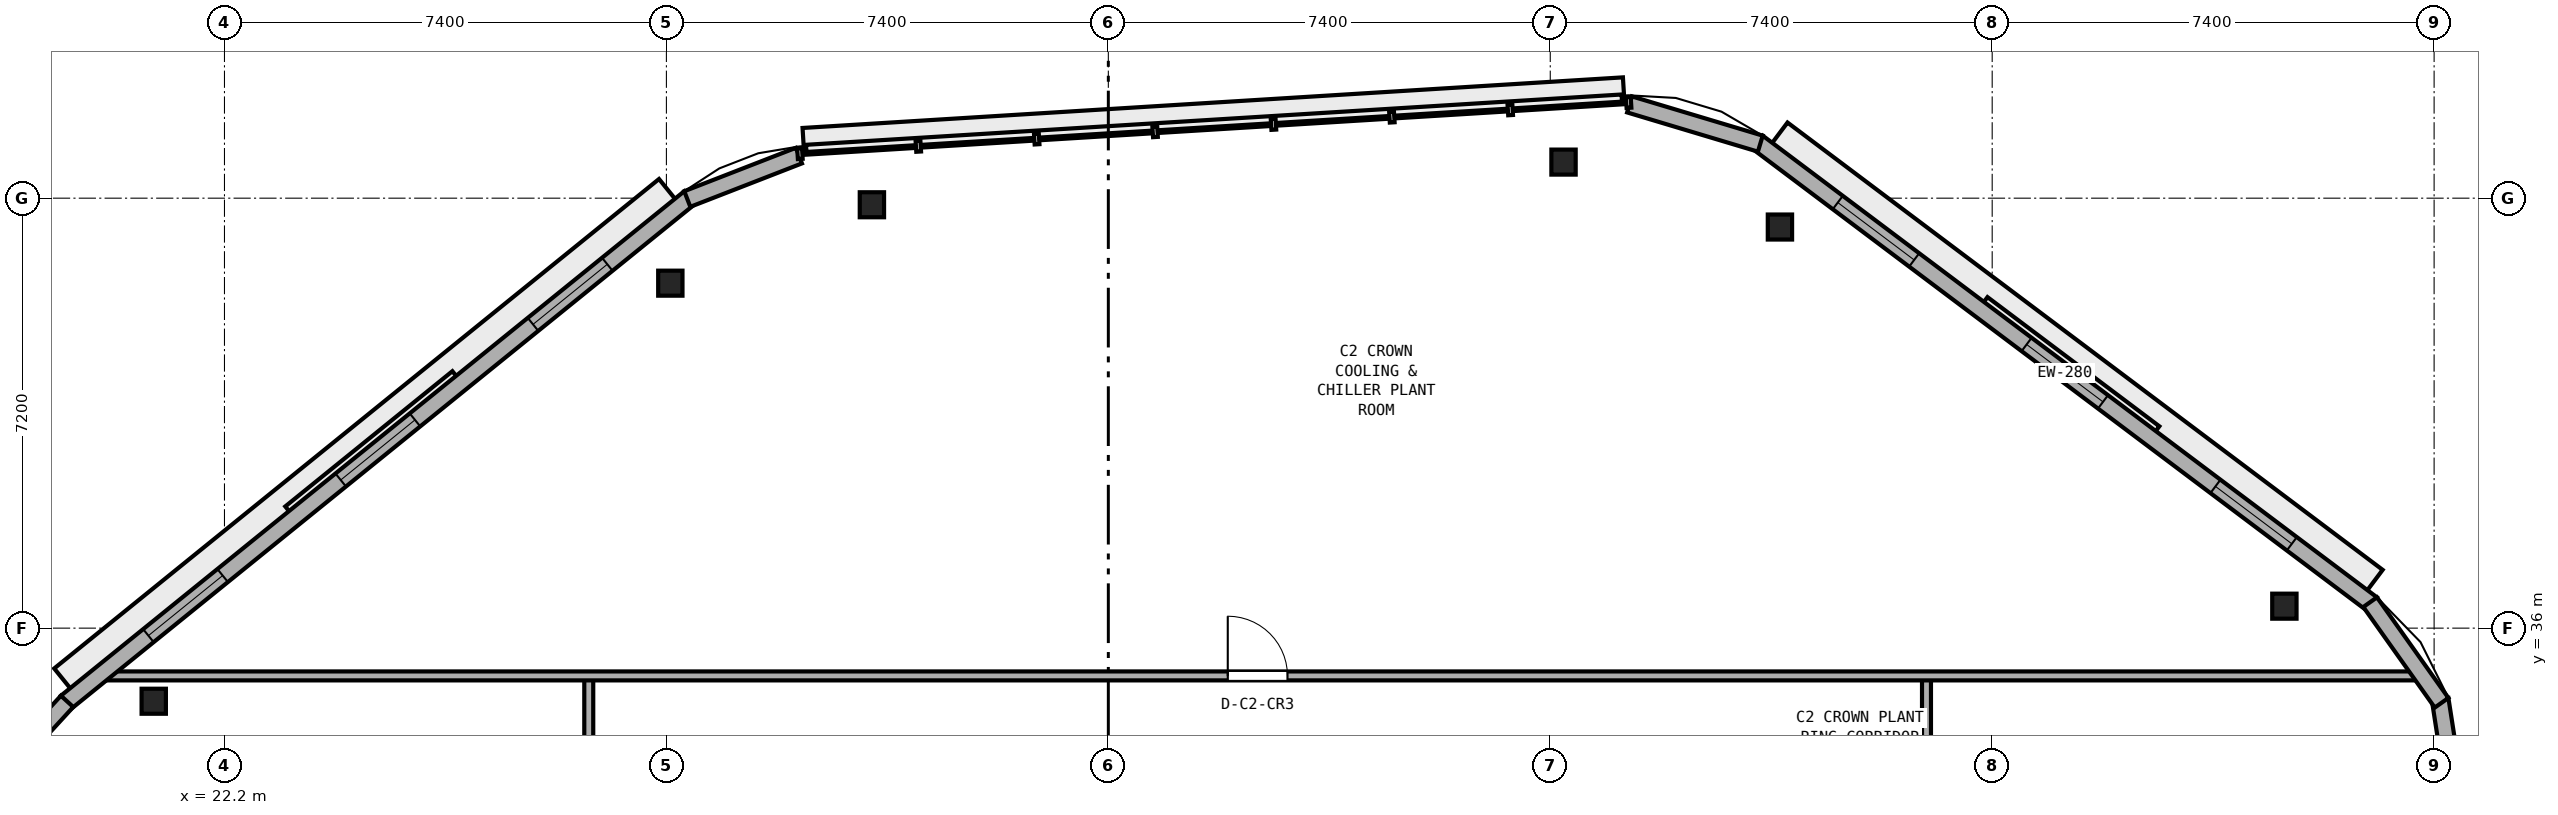
"""IFC4 building model, lengths in metres.
Left out: names, types, materials, properties, quantities, classifications, styles, units other than length and angle.
Written with IfcOpenShell. Run it as: python <this file> out.ifc"""

import sys

from ifc_helpers import new_model, si_unit, direction, frame, frame_2d, origin, origin_2d, place, context, subcontext, project, spatial, rectangle, i_section, extrude, element, fill, save


model = new_model("IFC4")
c1 = context("Model", 3, precision=1e-05, world=origin(), true_north=direction((0.0, 1.0)))
c2 = subcontext(c1, "Body", "Model", "MODEL_VIEW")
j1 = project(units=[si_unit("LENGTHUNIT", "METRE"), si_unit("PLANEANGLEUNIT", "RADIAN")], contexts=[c1])
p1 = place(None, origin())
s1 = spatial("IfcSite", under=j1, at=p1, CompositionType="ELEMENT")
p2 = place(p1, origin())
s2 = spatial("IfcBuilding", under=s1, at=p2, CompositionType="ELEMENT")
p3 = place(p2, frame((0.0, 0.0, 317.4)))
s3 = spatial("IfcBuildingStorey", under=s2, at=p3, CompositionType="ELEMENT", Elevation=317.4)
for number, where, z_axis, x_axis in (
    (1, (56.693, 36.368, 0.0), (0.0, 0.0, 1.0), (1.0, 0.0, 0.0)),
    (2, (48.246, 42.717, 0.0), (0.0, 0.0, 1.0), (1.0, 0.0, 0.0)),
    (3, (44.622, 43.804, 0.0), (0.0, 0.0, 1.0), (1.0, 0.0, 0.0)),
    (4, (33.041, 43.09, 0.0), (0.0, 0.0, 1.0), (1.0, 0.0, 0.0)),
    (5, (29.666, 41.777, 0.0), (0.0, 0.0, 1.0), (1.0, 0.0, 0.0)),
    (6, (21.016, 34.776, 0.0), (0.0, 0.0, 1.0), (1.0, 0.0, 0.0)),
):
    element("IfcColumn", number, at=place(p3, frame(where, z_axis=z_axis, x_axis=x_axis)), inside=s3, PredefinedType="COLUMN", context=c2, shape_type="SweptSolid", body=[
        extrude(i_section(OverallWidth=0.407, OverallDepth=0.419, WebThickness=0.031, FlangeThickness=0.049, at=origin_2d()), origin(), (0.0, 0.0, 1.0), 4.0),
    ])
p4 = place(p3, frame((50.7, 28.41, 0.0), z_axis=(0.0, 0.0, 1.0), x_axis=(0.0, 1.0, 0.0)))
e7 = element("IfcWall", 7, at=p4, inside=s3, PredefinedType="PARTITIONING", context=c2, shape_type="SweptSolid", body=[
    extrude(rectangle(XDim=6.79, YDim=0.15, at=frame_2d((3.395, 0.0))), origin(), (0.0, 0.0, 1.0), 3.72),
])
p5 = place(p3, frame((28.3, 15.2, 0.0), z_axis=(0.0, 0.0, 1.0), x_axis=(0.0, 1.0, 0.0)))
e8 = element("IfcWall", 8, at=p5, inside=s3, PredefinedType="PARTITIONING", context=c2, shape_type="SweptSolid", body=[
    extrude(rectangle(XDim=20.0, YDim=0.15, at=frame_2d((10.0, 0.0))), origin(), (0.0, 0.0, 1.0), 3.72),
])
p6 = place(p5, frame((9.5, 0.0, 0.0)))
e9 = element("IfcOpeningElement", 9, at=p6, cuts=e8, PredefinedType="OPENING", context=c2, shape_type="SweptSolid", body=[
    extrude(rectangle(XDim=1.0, YDim=2.12, at=frame_2d((0.5, 1.06))), frame((0.0, 0.085, 0.0), z_axis=(0.0, -1.0, 0.0), x_axis=(1.0, 0.0, 0.0)), (0.0, 0.0, 1.0), 0.17),
])
p7 = place(p3, frame((20.01, 35.2, 0.0), z_axis=(0.0, 0.0, 1.0), x_axis=(1.0, 0.0, 0.0)))
e10 = element("IfcWall", 10, at=p7, inside=s3, PredefinedType="PARTITIONING", context=c2, shape_type="SweptSolid", body=[
    extrude(rectangle(XDim=39.04, YDim=0.15, at=frame_2d((19.52, 0.0))), origin(), (0.0, 0.0, 1.0), 2.37),
])
p8 = place(p7, frame((18.99, 0.0, 0.0)))
e11 = element("IfcOpeningElement", 11, at=p8, cuts=e10, PredefinedType="OPENING", context=c2, shape_type="SweptSolid", body=[
    extrude(rectangle(XDim=1.0, YDim=2.12, at=frame_2d((0.5, 1.06))), frame((0.0, 0.085, 0.0), z_axis=(0.0, -1.0, 0.0), x_axis=(1.0, 0.0, 0.0)), (0.0, 0.0, 1.0), 0.17),
])
p9 = place(p3, frame((58.159, 36.404, 0.0), z_axis=(0.0, 0.0, 1.0), x_axis=(-0.799362001769, 0.600849723415, 0.0)))
e12 = element("IfcWall", 12, at=p9, inside=s3, PredefinedType="STANDARD", context=c2, shape_type="SweptSolid", body=[
    extrude(rectangle(XDim=12.867, YDim=0.28, at=frame_2d((6.433, 0.0))), origin(), (0.0, 0.0, 1.0), 3.72),
])
p10 = place(p9, frame((1.678, 0.0, 0.9)))
e13 = element("IfcOpeningElement", 13, at=p10, cuts=e12, PredefinedType="OPENING", context=c2, shape_type="SweptSolid", body=[
    extrude(rectangle(XDim=1.6, YDim=1.45, at=frame_2d((0.8, 0.725))), frame((0.0, 0.15, 0.0), z_axis=(0.0, -1.0, 0.0), x_axis=(1.0, 0.0, 0.0)), (0.0, 0.0, 1.0), 0.3),
])
p11 = place(p9, frame((5.633, 0.0, 0.9)))
e14 = element("IfcOpeningElement", 14, at=p11, cuts=e12, PredefinedType="OPENING", context=c2, shape_type="SweptSolid", body=[
    extrude(rectangle(XDim=1.6, YDim=1.45, at=frame_2d((0.8, 0.725))), frame((0.0, 0.15, 0.0), z_axis=(0.0, -1.0, 0.0), x_axis=(1.0, 0.0, 0.0)), (0.0, 0.0, 1.0), 0.3),
])
p12 = place(p9, frame((9.589, 0.0, 0.9)))
e15 = element("IfcOpeningElement", 15, at=p12, cuts=e12, PredefinedType="OPENING", context=c2, shape_type="SweptSolid", body=[
    extrude(rectangle(XDim=1.6, YDim=1.45, at=frame_2d((0.8, 0.725))), frame((0.0, 0.15, 0.0), z_axis=(0.0, -1.0, 0.0), x_axis=(1.0, 0.0, 0.0)), (0.0, 0.0, 1.0), 0.3),
])
p13 = place(p3, frame((29.987, 43.208, 0.0), z_axis=(0.0, 0.0, 1.0), x_axis=(-0.777319383305, -0.629106172548, 0.0)))
e16 = element("IfcWall", 16, at=p13, inside=s3, PredefinedType="STANDARD", context=c2, shape_type="SweptSolid", body=[
    extrude(rectangle(XDim=13.428, YDim=0.28, at=frame_2d((6.714, 0.0))), origin(), (0.0, 0.0, 1.0), 3.72),
])
p14 = place(p13, frame((1.771, 0.0, 0.9)))
e17 = element("IfcOpeningElement", 17, at=p14, cuts=e16, PredefinedType="OPENING", context=c2, shape_type="SweptSolid", body=[
    extrude(rectangle(XDim=1.6, YDim=1.45, at=frame_2d((0.8, 0.725))), frame((0.0, 0.15, 0.0), z_axis=(0.0, -1.0, 0.0), x_axis=(1.0, 0.0, 0.0)), (0.0, 0.0, 1.0), 0.3),
])
p15 = place(p13, frame((5.914, 0.0, 0.9)))
e18 = element("IfcOpeningElement", 18, at=p15, cuts=e16, PredefinedType="OPENING", context=c2, shape_type="SweptSolid", body=[
    extrude(rectangle(XDim=1.6, YDim=1.45, at=frame_2d((0.8, 0.725))), frame((0.0, 0.15, 0.0), z_axis=(0.0, -1.0, 0.0), x_axis=(1.0, 0.0, 0.0)), (0.0, 0.0, 1.0), 0.3),
])
p16 = place(p13, frame((10.057, 0.0, 0.9)))
e19 = element("IfcOpeningElement", 19, at=p16, cuts=e16, PredefinedType="OPENING", context=c2, shape_type="SweptSolid", body=[
    extrude(rectangle(XDim=1.6, YDim=1.45, at=frame_2d((0.8, 0.725))), frame((0.0, 0.15, 0.0), z_axis=(0.0, -1.0, 0.0), x_axis=(1.0, 0.0, 0.0)), (0.0, 0.0, 1.0), 0.3),
])
p17 = place(p3, frame((59.452, 33.841, 0.0), z_axis=(0.0, 0.0, 1.0), x_axis=(-0.153890702538, 0.988087876493, 0.0)))
e20 = element("IfcWall", 20, at=p17, inside=s3, PredefinedType="STANDARD", context=c2, shape_type="SweptSolid", body=[
    extrude(rectangle(XDim=0.98, YDim=0.28, at=frame_2d((0.49, 0.0))), origin(), (0.0, 0.0, 1.0), 3.72),
])
p18 = place(p3, frame((59.325, 34.75, 0.0), z_axis=(0.0, 0.0, 1.0), x_axis=(-0.578944699304, 0.815366810183, 0.0)))
e21 = element("IfcWall", 21, at=p18, inside=s3, PredefinedType="STANDARD", context=c2, shape_type="SweptSolid", body=[
    extrude(rectangle(XDim=2.066, YDim=0.28, at=frame_2d((1.033, 0.0))), origin(), (0.0, 0.0, 1.0), 3.72),
])
p19 = place(p3, frame((47.917, 44.113, 0.0), z_axis=(0.0, 0.0, 1.0), x_axis=(-0.957835100655, 0.287318499149, 0.0)))
e22 = element("IfcWall", 22, at=p19, inside=s3, PredefinedType="STANDARD", context=c2, shape_type="SweptSolid", body=[
    extrude(rectangle(XDim=2.287, YDim=0.28, at=frame_2d((1.143, 0.0))), origin(), (0.0, 0.0, 1.0), 3.72),
])
p20 = place(p3, frame((31.819, 43.913, 0.0), z_axis=(0.0, 0.0, 1.0), x_axis=(-0.931977254785, -0.362516753494, 0.0)))
e23 = element("IfcWall", 23, at=p20, inside=s3, PredefinedType="STANDARD", context=c2, shape_type="SweptSolid", body=[
    extrude(rectangle(XDim=2.006, YDim=0.28, at=frame_2d((1.003, 0.0))), origin(), (0.0, 0.0, 1.0), 3.72),
])
p21 = place(p3, frame((19.564, 34.774, 0.0), z_axis=(0.0, 0.0, 1.0), x_axis=(-0.675845585144, -0.737043245028, 0.0)))
e24 = element("IfcWall", 24, at=p21, inside=s3, PredefinedType="STANDARD", context=c2, shape_type="SweptSolid", body=[
    extrude(rectangle(XDim=1.005, YDim=0.28, at=frame_2d((0.503, 0.0))), origin(), (0.0, 0.0, 1.0), 3.72),
])
p22 = place(p8, origin())
e25 = element("IfcDoor", 25, at=p22, inside=s3, OperationType="SINGLE_SWING_LEFT", PredefinedType="DOOR", context=c2, shape_type="SweptSolid", body=[
    extrude(rectangle(XDim=1.0, YDim=2.12, at=frame_2d((0.5, 1.06))), frame((0.0, 0.025, 0.0), z_axis=(0.0, -1.0, 0.0), x_axis=(1.0, 0.0, 0.0)), (0.0, 0.0, 1.0), 0.05),
])
fill(e11, e25)
p23 = place(p10, origin())
e26 = element("IfcWindow", 26, at=p23, inside=s3, PartitioningType="SINGLE_PANEL", PredefinedType="WINDOW", context=c2, shape_type="SweptSolid", body=[
    extrude(rectangle(XDim=1.6, YDim=1.45, at=frame_2d((0.8, 0.725))), frame((0.0, 0.03, 0.0), z_axis=(0.0, -1.0, 0.0), x_axis=(1.0, 0.0, 0.0)), (0.0, 0.0, 1.0), 0.06),
])
fill(e13, e26)
p24 = place(p11, origin())
e27 = element("IfcWindow", 27, at=p24, inside=s3, PartitioningType="SINGLE_PANEL", PredefinedType="WINDOW", context=c2, shape_type="SweptSolid", body=[
    extrude(rectangle(XDim=1.6, YDim=1.45, at=frame_2d((0.8, 0.725))), frame((0.0, 0.03, 0.0), z_axis=(0.0, -1.0, 0.0), x_axis=(1.0, 0.0, 0.0)), (0.0, 0.0, 1.0), 0.06),
])
fill(e14, e27)
p25 = place(p12, origin())
e28 = element("IfcWindow", 28, at=p25, inside=s3, PartitioningType="SINGLE_PANEL", PredefinedType="WINDOW", context=c2, shape_type="SweptSolid", body=[
    extrude(rectangle(XDim=1.6, YDim=1.45, at=frame_2d((0.8, 0.725))), frame((0.0, 0.03, 0.0), z_axis=(0.0, -1.0, 0.0), x_axis=(1.0, 0.0, 0.0)), (0.0, 0.0, 1.0), 0.06),
])
fill(e15, e28)
p26 = place(p14, origin())
e29 = element("IfcWindow", 29, at=p26, inside=s3, PartitioningType="SINGLE_PANEL", PredefinedType="WINDOW", context=c2, shape_type="SweptSolid", body=[
    extrude(rectangle(XDim=1.6, YDim=1.45, at=frame_2d((0.8, 0.725))), frame((0.0, 0.03, 0.0), z_axis=(0.0, -1.0, 0.0), x_axis=(1.0, 0.0, 0.0)), (0.0, 0.0, 1.0), 0.06),
])
fill(e17, e29)
p27 = place(p15, origin())
e30 = element("IfcWindow", 30, at=p27, inside=s3, PartitioningType="SINGLE_PANEL", PredefinedType="WINDOW", context=c2, shape_type="SweptSolid", body=[
    extrude(rectangle(XDim=1.6, YDim=1.45, at=frame_2d((0.8, 0.725))), frame((0.0, 0.03, 0.0), z_axis=(0.0, -1.0, 0.0), x_axis=(1.0, 0.0, 0.0)), (0.0, 0.0, 1.0), 0.06),
])
fill(e18, e30)
p28 = place(p16, origin())
e31 = element("IfcWindow", 31, at=p28, inside=s3, PartitioningType="SINGLE_PANEL", PredefinedType="WINDOW", context=c2, shape_type="SweptSolid", body=[
    extrude(rectangle(XDim=1.6, YDim=1.45, at=frame_2d((0.8, 0.725))), frame((0.0, 0.03, 0.0), z_axis=(0.0, -1.0, 0.0), x_axis=(1.0, 0.0, 0.0)), (0.0, 0.0, 1.0), 0.06),
])
fill(e19, e31)
save(model, sys.argv[1])
